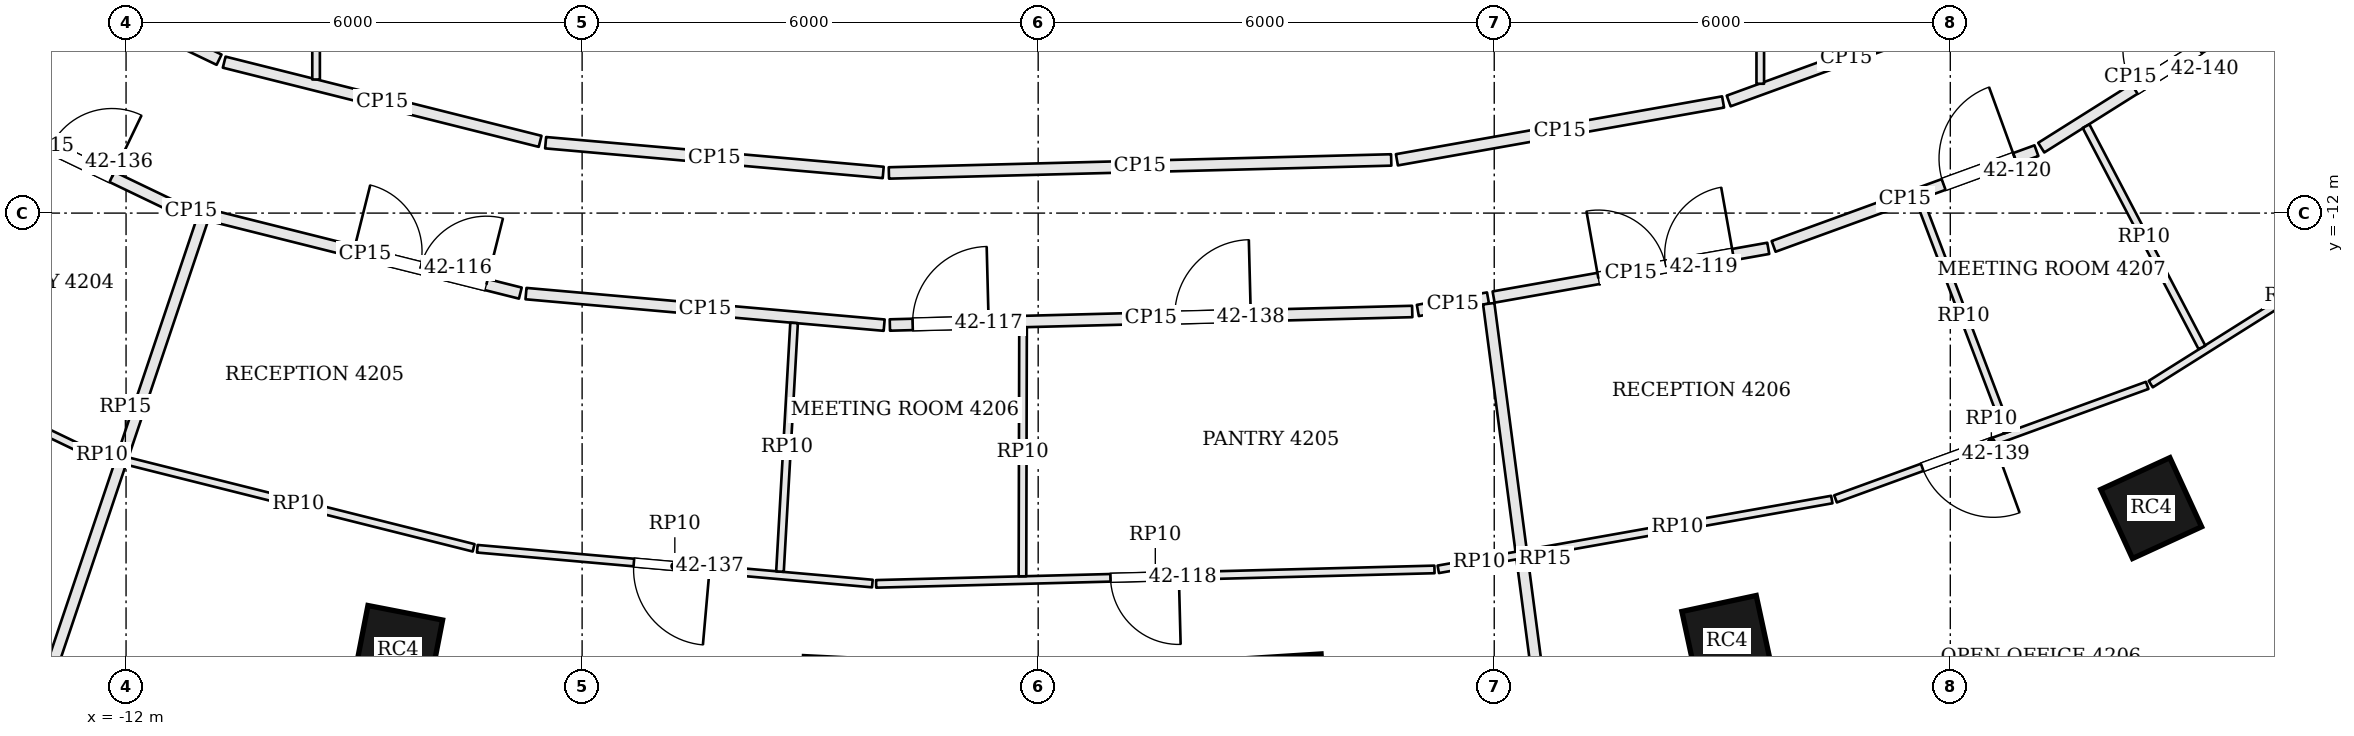
"""IFC4 building model, lengths in metres.
Left out: names, types, materials, properties, quantities, classifications, styles, units other than length and angle.
Written with IfcOpenShell. Run it as: python <this file> out.ifc"""

import sys

from ifc_helpers import new_model, si_unit, direction, frame, frame_2d, origin, origin_2d, place, context, subcontext, project, spatial, rectangle, extrude, element, fill, save


model = new_model("IFC4")
c1 = context("Model", 3, precision=1e-05, world=origin(), true_north=direction((0.0, 1.0)))
c2 = subcontext(c1, "Body", "Model", "MODEL_VIEW")
j1 = project(units=[si_unit("LENGTHUNIT", "METRE"), si_unit("PLANEANGLEUNIT", "RADIAN")], contexts=[c1])
p1 = place(None, origin())
s1 = spatial("IfcSite", under=j1, at=p1, CompositionType="ELEMENT")
p2 = place(p1, origin())
s2 = spatial("IfcBuilding", under=s1, at=p2, CompositionType="ELEMENT")
p3 = place(p2, frame((0.0, 0.0, 174.0)))
s3 = spatial("IfcBuildingStorey", under=s2, at=p3, CompositionType="ELEMENT", Elevation=174.0)
for number, where, z_axis, x_axis in (
    (1, (-8.422, -17.749, -0.7), (0.0, 0.0, 1.0), (0.982, -0.191, 0.0)),
    (2, (3.254, -18.33, -0.7), (0.0, 0.0, 1.0), (0.998, 0.063, 0.0)),
    (3, (9.063, -17.625, -0.7), (0.0, 0.0, 1.0), (0.978, 0.21, 0.0)),
    (4, (14.643, -15.881, -0.7), (0.0, 0.0, 1.0), (0.909, 0.417, 0.0)),
):
    element("IfcColumn", number, at=place(p3, frame(where, z_axis=z_axis, x_axis=x_axis)), inside=s3, PredefinedType="COLUMN", context=c2, shape_type="SweptSolid", body=[
        extrude(rectangle(XDim=1.0, YDim=1.0, at=origin_2d()), origin(), (0.0, 0.0, 1.0), 4.6),
    ])
p4 = place(p3, frame((-14.664, -10.334, 0.0), z_axis=(0.0, 0.0, 1.0), x_axis=(0.901507315282, -0.432763862278, 0.0)))
e5 = element("IfcWall", 5, at=p4, inside=s3, PredefinedType="PARTITIONING", context=c2, shape_type="SweptSolid", body=[
    extrude(rectangle(XDim=3.63, YDim=0.15, at=frame_2d((1.815, 0.0))), origin(), (0.0, 0.0, 1.0), 3.084),
])
p5 = place(p4, frame((1.85, 0.0, 0.0)))
e6 = element("IfcOpeningElement", 6, at=p5, cuts=e5, PredefinedType="OPENING", context=c2, shape_type="SweptSolid", body=[
    extrude(rectangle(XDim=0.9, YDim=2.1, at=frame_2d((0.45, 1.05))), frame((0.0, 0.085, 0.0), z_axis=(0.0, -1.0, 0.0), x_axis=(1.0, 0.0, 0.0)), (0.0, 0.0, 1.0), 0.17),
])
p6 = place(p3, frame((-11.319, -11.923, 0.0), z_axis=(0.0, 0.0, 1.0), x_axis=(0.969942256681, -0.243335198242, 0.0)))
e7 = element("IfcWall", 7, at=p6, inside=s3, PredefinedType="PARTITIONING", context=c2, shape_type="SweptSolid", body=[
    extrude(rectangle(XDim=0.359, YDim=0.15, at=frame_2d((0.18, 0.0))), origin(), (0.0, 0.0, 1.0), 3.084),
])
p7 = place(p3, frame((-13.024, -18.112, 0.0), z_axis=(0.0, 0.0, 1.0), x_axis=(0.319081027508, 0.947727438605, 0.0)))
e8 = element("IfcWall", 8, at=p7, inside=s3, PredefinedType="PARTITIONING", context=c2, shape_type="SweptSolid", body=[
    extrude(rectangle(XDim=6.363, YDim=0.15, at=frame_2d((3.181, 0.0))), origin(), (0.0, 0.0, 1.0), 3.234),
])
p8 = place(p3, frame((-10.897, -12.029, 0.0), z_axis=(0.0, 0.0, 1.0), x_axis=(0.969999087169, -0.24310855783, 0.0)))
e9 = element("IfcWall", 9, at=p8, inside=s3, PredefinedType="PARTITIONING", context=c2, shape_type="SweptSolid", body=[
    extrude(rectangle(XDim=4.211, YDim=0.15, at=frame_2d((2.105, 0.0))), origin(), (0.0, 0.0, 1.0), 3.084),
])
p9 = place(p8, frame((1.95, 0.0, 0.0)))
e10 = element("IfcOpeningElement", 10, at=p9, cuts=e9, PredefinedType="OPENING", context=c2, shape_type="SweptSolid", body=[
    extrude(rectangle(XDim=1.8, YDim=2.1, at=frame_2d((0.9, 1.05))), frame((0.0, 0.085, 0.0), z_axis=(0.0, -1.0, 0.0), x_axis=(1.0, 0.0, 0.0)), (0.0, 0.0, 1.0), 0.17),
])
p10 = place(p3, frame((-6.738, -13.059, 0.0), z_axis=(0.0, 0.0, 1.0), x_axis=(0.996143527037, -0.087738666181, 0.0)))
e11 = element("IfcWall", 11, at=p10, inside=s3, PredefinedType="PARTITIONING", context=c2, shape_type="SweptSolid", body=[
    extrude(rectangle(XDim=4.73, YDim=0.15, at=frame_2d((2.365, 0.0))), origin(), (0.0, 0.0, 1.0), 3.084),
])
p11 = place(p3, frame((-1.951, -13.472, 0.0), z_axis=(0.0, 0.0, 1.0), x_axis=(0.999663898238, 0.025924709429, 0.0)))
e12 = element("IfcWall", 12, at=p11, inside=s3, PredefinedType="PARTITIONING", context=c2, shape_type="SweptSolid", body=[
    extrude(rectangle(XDim=6.875, YDim=0.15, at=frame_2d((3.437, 0.0))), origin(), (0.0, 0.0, 1.0), 3.084),
])
p12 = place(p11, frame((0.3, 0.0, 0.0)))
e13 = element("IfcOpeningElement", 13, at=p12, cuts=e12, PredefinedType="OPENING", context=c2, shape_type="SweptSolid", body=[
    extrude(rectangle(XDim=1.0, YDim=2.4, at=frame_2d((0.5, 1.2))), frame((0.0, 0.085, 0.0), z_axis=(0.0, -1.0, 0.0), x_axis=(1.0, 0.0, 0.0)), (0.0, 0.0, 1.0), 0.17),
])
p13 = place(p11, frame((3.75, 0.0, 0.0)))
e14 = element("IfcOpeningElement", 14, at=p13, cuts=e12, PredefinedType="OPENING", context=c2, shape_type="SweptSolid", body=[
    extrude(rectangle(XDim=1.0, YDim=2.1, at=frame_2d((0.5, 1.05))), frame((0.0, 0.085, 0.0), z_axis=(0.0, -1.0, 0.0), x_axis=(1.0, 0.0, 0.0)), (0.0, 0.0, 1.0), 0.17),
])
p14 = place(p3, frame((4.995, -13.281, 0.0), z_axis=(0.0, 0.0, 1.0), x_axis=(0.984615318048, 0.174736016506, 0.0)))
e15 = element("IfcWall", 15, at=p14, inside=s3, PredefinedType="PARTITIONING", context=c2, shape_type="SweptSolid", body=[
    extrude(rectangle(XDim=0.938, YDim=0.15, at=frame_2d((0.469, 0.0))), origin(), (0.0, 0.0, 1.0), 3.084),
])
p15 = place(p3, frame((6.807, -19.901, 0.0), z_axis=(0.0, 0.0, 1.0), x_axis=(-0.129934596003, 0.991522566945, 0.0)))
e16 = element("IfcWall", 16, at=p15, inside=s3, PredefinedType="PARTITIONING", context=c2, shape_type="SweptSolid", body=[
    extrude(rectangle(XDim=6.766, YDim=0.15, at=frame_2d((3.383, 0.0))), origin(), (0.0, 0.0, 1.0), 3.234),
])
p16 = place(p3, frame((5.992, -13.104, 0.0), z_axis=(0.0, 0.0, 1.0), x_axis=(0.98463249319, 0.174639209096, 0.0)))
e17 = element("IfcWall", 17, at=p16, inside=s3, PredefinedType="PARTITIONING", context=c2, shape_type="SweptSolid", body=[
    extrude(rectangle(XDim=3.67, YDim=0.15, at=frame_2d((1.835, 0.0))), origin(), (0.0, 0.0, 1.0), 3.084),
])
p17 = place(p16, frame((1.4, 0.0, 0.0)))
e18 = element("IfcOpeningElement", 18, at=p17, cuts=e17, PredefinedType="OPENING", context=c2, shape_type="SweptSolid", body=[
    extrude(rectangle(XDim=1.8, YDim=2.1, at=frame_2d((0.9, 1.05))), frame((0.0, 0.085, 0.0), z_axis=(0.0, -1.0, 0.0), x_axis=(1.0, 0.0, 0.0)), (0.0, 0.0, 1.0), 0.17),
])
p18 = place(p3, frame((9.676, -12.438, 0.0), z_axis=(0.0, 0.0, 1.0), x_axis=(0.939640289748, 0.342163887461, 0.0)))
e19 = element("IfcWall", 19, at=p18, inside=s3, PredefinedType="PARTITIONING", context=c2, shape_type="SweptSolid", body=[
    extrude(rectangle(XDim=3.68, YDim=0.15, at=frame_2d((1.84, 0.0))), origin(), (0.0, 0.0, 1.0), 3.084),
])
p19 = place(p18, frame((2.38, 0.0, 0.0)))
e20 = element("IfcOpeningElement", 20, at=p19, cuts=e19, PredefinedType="OPENING", context=c2, shape_type="SweptSolid", body=[
    extrude(rectangle(XDim=1.0, YDim=2.4, at=frame_2d((0.5, 1.2))), frame((0.0, 0.085, 0.0), z_axis=(0.0, -1.0, 0.0), x_axis=(1.0, 0.0, 0.0)), (0.0, 0.0, 1.0), 0.17),
])
p20 = place(p3, frame((13.197, -11.139, 0.0), z_axis=(0.0, 0.0, 1.0), x_axis=(0.846390903833, 0.532562144644, 0.0)))
e21 = element("IfcWall", 21, at=p20, inside=s3, PredefinedType="PARTITIONING", context=c2, shape_type="SweptSolid", body=[
    extrude(rectangle(XDim=3.481, YDim=0.15, at=frame_2d((1.741, 0.0))), origin(), (0.0, 0.0, 1.0), 3.084),
])
p21 = place(p20, frame((1.45, 0.0, 0.0)))
e22 = element("IfcOpeningElement", 22, at=p21, cuts=e21, PredefinedType="OPENING", context=c2, shape_type="SweptSolid", body=[
    extrude(rectangle(XDim=1.0, YDim=2.1, at=frame_2d((0.5, 1.05))), frame((0.0, 0.085, 0.0), z_axis=(0.0, -1.0, 0.0), x_axis=(1.0, 0.0, 0.0)), (0.0, 0.0, 1.0), 0.17),
])
p22 = place(p3, frame((12.178, -9.398, 0.0), z_axis=(0.0, 0.0, 1.0), x_axis=(-0.939609240084, -0.342249143093, 0.0)))
e23 = element("IfcWall", 23, at=p22, inside=s3, PredefinedType="PARTITIONING", context=c2, shape_type="SweptSolid", body=[
    extrude(rectangle(XDim=3.292, YDim=0.15, at=frame_2d((1.646, 0.0))), origin(), (0.0, 0.0, 1.0), 3.084),
])
p23 = place(p3, frame((9.01, -10.538, 0.0), z_axis=(0.0, 0.0, 1.0), x_axis=(-0.984645638575, -0.174565077936, 0.0)))
e24 = element("IfcWall", 24, at=p23, inside=s3, PredefinedType="PARTITIONING", context=c2, shape_type="SweptSolid", body=[
    extrude(rectangle(XDim=4.358, YDim=0.15, at=frame_2d((2.179, 0.0))), origin(), (0.0, 0.0, 1.0), 3.084),
])
p24 = place(p3, frame((4.645, -11.301, 0.0), z_axis=(0.0, 0.0, 1.0), x_axis=(-0.9996648469, -0.02588810291, 0.0)))
e25 = element("IfcWall", 25, at=p24, inside=s3, PredefinedType="PARTITIONING", context=c2, shape_type="SweptSolid", body=[
    extrude(rectangle(XDim=6.611, YDim=0.15, at=frame_2d((3.305, 0.0))), origin(), (0.0, 0.0, 1.0), 3.084),
])
p25 = place(p3, frame((-2.039, -11.465, 0.0), z_axis=(0.0, 0.0, 1.0), x_axis=(-0.996139855484, 0.087780341286, 0.0)))
e26 = element("IfcWall", 26, at=p25, inside=s3, PredefinedType="PARTITIONING", context=c2, shape_type="SweptSolid", body=[
    extrude(rectangle(XDim=4.458, YDim=0.15, at=frame_2d((2.229, 0.0))), origin(), (0.0, 0.0, 1.0), 3.084),
])
p26 = place(p3, frame((-6.553, -11.056, 0.0), z_axis=(0.0, 0.0, 1.0), x_axis=(-0.970004917182, 0.243085294995, 0.0)))
e27 = element("IfcWall", 27, at=p26, inside=s3, PredefinedType="PARTITIONING", context=c2, shape_type="SweptSolid", body=[
    extrude(rectangle(XDim=4.284, YDim=0.15, at=frame_2d((2.142, 0.0))), origin(), (0.0, 0.0, 1.0), 3.084),
])
p27 = place(p3, frame((-10.776, -9.982, 0.0), z_axis=(0.0, 0.0, 1.0), x_axis=(-0.901511079436, 0.432756020933, 0.0)))
e28 = element("IfcWall", 28, at=p27, inside=s3, PredefinedType="PARTITIONING", context=c2, shape_type="SweptSolid", body=[
    extrude(rectangle(XDim=3.181, YDim=0.15, at=frame_2d((1.59, 0.0))), origin(), (0.0, 0.0, 1.0), 3.084),
])
p28 = place(p3, frame((-12.078, -15.238, 0.0), z_axis=(0.0, 0.0, 1.0), x_axis=(-0.970024978464, 0.243005228658, 0.0)))
e29 = element("IfcWall", 29, at=p28, inside=s3, PredefinedType="PARTITIONING", context=c2, shape_type="SweptSolid", body=[
    extrude(rectangle(XDim=0.489, YDim=0.1, at=frame_2d((0.245, 0.0))), origin(), (0.0, 0.0, 1.0), 3.084),
])
p29 = place(p3, frame((-12.597, -15.098, 0.0), z_axis=(0.0, 0.0, 1.0), x_axis=(-0.901514437286, 0.432749025839, 0.0)))
e30 = element("IfcWall", 30, at=p29, inside=s3, PredefinedType="PARTITIONING", context=c2, shape_type="SweptSolid", body=[
    extrude(rectangle(XDim=4.42, YDim=0.1, at=frame_2d((2.21, 0.0))), origin(), (0.0, 0.0, 1.0), 3.084),
])
p30 = place(p3, frame((6.34, -16.496, 0.0), z_axis=(0.0, 0.0, 1.0), x_axis=(-0.984632558058, -0.174638843366, 0.0)))
e31 = element("IfcWall", 31, at=p30, inside=s3, PredefinedType="PARTITIONING", context=c2, shape_type="SweptSolid", body=[
    extrude(rectangle(XDim=1.093, YDim=0.1, at=frame_2d((0.547, 0.0))), origin(), (0.0, 0.0, 1.0), 3.084),
])
p31 = place(p3, frame((5.214, -16.688, 0.0), z_axis=(0.0, 0.0, 1.0), x_axis=(-0.999664981446, -0.025882906921, 0.0)))
e32 = element("IfcWall", 32, at=p31, inside=s3, PredefinedType="PARTITIONING", context=c2, shape_type="SweptSolid", body=[
    extrude(rectangle(XDim=7.348, YDim=0.1, at=frame_2d((3.674, 0.0))), origin(), (0.0, 0.0, 1.0), 3.084),
])
p32 = place(p31, frame((3.364, 0.0, 0.0)))
e33 = element("IfcOpeningElement", 33, at=p32, cuts=e32, PredefinedType="OPENING", context=c2, shape_type="SweptSolid", body=[
    extrude(rectangle(XDim=0.9, YDim=2.1, at=frame_2d((0.45, 1.05))), frame((0.0, 0.06, 0.0), z_axis=(0.0, -1.0, 0.0), x_axis=(1.0, 0.0, 0.0)), (0.0, 0.0, 1.0), 0.12),
])
p33 = place(p3, frame((-2.181, -16.874, 0.0), z_axis=(0.0, 0.0, 1.0), x_axis=(-0.996143934904, 0.087734035321, 0.0)))
e34 = element("IfcWall", 34, at=p33, inside=s3, PredefinedType="PARTITIONING", context=c2, shape_type="SweptSolid", body=[
    extrude(rectangle(XDim=5.218, YDim=0.1, at=frame_2d((2.609, 0.0))), origin(), (0.0, 0.0, 1.0), 3.084),
])
p34 = place(p33, frame((2.15, 0.0, 0.0)))
e35 = element("IfcOpeningElement", 35, at=p34, cuts=e34, PredefinedType="OPENING", context=c2, shape_type="SweptSolid", body=[
    extrude(rectangle(XDim=1.0, YDim=2.1, at=frame_2d((0.5, 1.05))), frame((0.0, 0.06, 0.0), z_axis=(0.0, -1.0, 0.0), x_axis=(1.0, 0.0, 0.0)), (0.0, 0.0, 1.0), 0.12),
])
p35 = place(p3, frame((-7.427, -16.404, 0.0), z_axis=(0.0, 0.0, 1.0), x_axis=(-0.970009433409, 0.243067272783, 0.0)))
e36 = element("IfcWall", 36, at=p35, inside=s3, PredefinedType="PARTITIONING", context=c2, shape_type="SweptSolid", body=[
    extrude(rectangle(XDim=4.754, YDim=0.1, at=frame_2d((2.377, 0.0))), origin(), (0.0, 0.0, 1.0), 3.084),
])
p36 = place(p3, frame((-3.211, -13.445, 0.0), z_axis=(0.0, 0.0, 1.0), x_axis=(-0.056703901856, -0.99839103938, 0.0)))
e37 = element("IfcWall", 37, at=p36, inside=s3, PredefinedType="PARTITIONING", context=c2, shape_type="SweptSolid", body=[
    extrude(rectangle(XDim=3.277, YDim=0.1, at=frame_2d((1.638, 0.0))), origin(), (0.0, 0.0, 1.0), 3.084),
])
p37 = place(p3, frame((-0.199, -13.502, 0.0), z_axis=(0.0, 0.0, 1.0), x_axis=(-0.002309978934, -0.999997331995, 0.0)))
e38 = element("IfcWall", 38, at=p37, inside=s3, PredefinedType="PARTITIONING", context=c2, shape_type="SweptSolid", body=[
    extrude(rectangle(XDim=3.276, YDim=0.1, at=frame_2d((1.638, 0.0))), origin(), (0.0, 0.0, 1.0), 3.084),
])
p38 = place(p3, frame((18.316, -11.935, 0.0), z_axis=(0.0, 0.0, 1.0), x_axis=(-0.84637539713, -0.532586788358, 0.0)))
e39 = element("IfcWall", 39, at=p38, inside=s3, PredefinedType="PARTITIONING", context=c2, shape_type="SweptSolid", body=[
    extrude(rectangle(XDim=4.346, YDim=0.1, at=frame_2d((2.173, 0.0))), origin(), (0.0, 0.0, 1.0), 3.084),
])
p39 = place(p3, frame((14.59, -14.267, 0.0), z_axis=(0.0, 0.0, 1.0), x_axis=(-0.939623405418, -0.342210251148, 0.0)))
e40 = element("IfcWall", 40, at=p39, inside=s3, PredefinedType="PARTITIONING", context=c2, shape_type="SweptSolid", body=[
    extrude(rectangle(XDim=4.363, YDim=0.1, at=frame_2d((2.182, 0.0))), origin(), (0.0, 0.0, 1.0), 3.084),
])
p40 = place(p39, frame((2.15, 0.0, 0.0)))
e41 = element("IfcOpeningElement", 41, at=p40, cuts=e40, PredefinedType="OPENING", context=c2, shape_type="SweptSolid", body=[
    extrude(rectangle(XDim=1.0, YDim=2.1, at=frame_2d((0.5, 1.05))), frame((0.0, 0.06, 0.0), z_axis=(0.0, -1.0, 0.0), x_axis=(1.0, 0.0, 0.0)), (0.0, 0.0, 1.0), 0.12),
])
p41 = place(p3, frame((10.441, -15.769, 0.0), z_axis=(0.0, 0.0, 1.0), x_axis=(-0.984637220861, -0.174612551941, 0.0)))
e42 = element("IfcWall", 42, at=p41, inside=s3, PredefinedType="PARTITIONING", context=c2, shape_type="SweptSolid", body=[
    extrude(rectangle(XDim=4.125, YDim=0.1, at=frame_2d((2.062, 0.0))), origin(), (0.0, 0.0, 1.0), 3.084),
])
p42 = place(p3, frame((11.594, -11.819, 0.0), z_axis=(0.0, 0.0, 1.0), x_axis=(0.354584575087, -0.935023945742, 0.0)))
e43 = element("IfcWall", 43, at=p42, inside=s3, PredefinedType="PARTITIONING", context=c2, shape_type="SweptSolid", body=[
    extrude(rectangle(XDim=3.275, YDim=0.1, at=frame_2d((1.638, 0.0))), origin(), (0.0, 0.0, 1.0), 3.084),
])
p43 = place(p3, frame((13.786, -10.856, 0.0), z_axis=(0.0, 0.0, 1.0), x_axis=(0.464015323866, -0.885827172318, 0.0)))
e44 = element("IfcWall", 44, at=p43, inside=s3, PredefinedType="PARTITIONING", context=c2, shape_type="SweptSolid", body=[
    extrude(rectangle(XDim=3.286, YDim=0.1, at=frame_2d((1.643, 0.0))), origin(), (0.0, 0.0, 1.0), 3.084),
])
p44 = place(p3, frame((-9.5, -10.242, 0.0), z_axis=(0.0, 0.0, 1.0), x_axis=(0.0, 1.0, 0.0)))
e45 = element("IfcWall", 45, at=p44, inside=s3, PredefinedType="PARTITIONING", context=c2, shape_type="SweptSolid", body=[
    extrude(rectangle(XDim=5.167, YDim=0.1, at=frame_2d((2.583, 0.0))), origin(), (0.0, 0.0, 1.0), 3.084),
])
p45 = place(p3, frame((9.5, -10.299, 0.0), z_axis=(0.0, 0.0, 1.0), x_axis=(0.0, 1.0, 0.0)))
e46 = element("IfcWall", 46, at=p45, inside=s3, PredefinedType="PARTITIONING", context=c2, shape_type="SweptSolid", body=[
    extrude(rectangle(XDim=5.224, YDim=0.1, at=frame_2d((2.612, 0.0))), origin(), (0.0, 0.0, 1.0), 3.084),
])
p46 = place(p9, origin())
e47 = element("IfcDoor", 47, at=p46, inside=s3, OperationType="DOUBLE_DOOR_SINGLE_SWING", PredefinedType="DOOR", context=c2, shape_type="SweptSolid", body=[
    extrude(rectangle(XDim=1.8, YDim=2.1, at=frame_2d((0.9, 1.05))), frame((0.0, 0.025, 0.0), z_axis=(0.0, -1.0, 0.0), x_axis=(1.0, 0.0, 0.0)), (0.0, 0.0, 1.0), 0.05),
])
fill(e10, e47)
p47 = place(p12, origin())
e48 = element("IfcDoor", 48, at=p47, inside=s3, OperationType="SINGLE_SWING_RIGHT", PredefinedType="DOOR", context=c2, shape_type="SweptSolid", body=[
    extrude(rectangle(XDim=1.0, YDim=2.4, at=frame_2d((0.5, 1.2))), frame((0.0, 0.025, 0.0), z_axis=(0.0, -1.0, 0.0), x_axis=(1.0, 0.0, 0.0)), (0.0, 0.0, 1.0), 0.05),
])
fill(e13, e48)
p48 = place(p32, origin())
e49 = element("IfcDoor", 49, at=p48, inside=s3, OperationType="SINGLE_SWING_LEFT", PredefinedType="DOOR", context=c2, shape_type="SweptSolid", body=[
    extrude(rectangle(XDim=0.9, YDim=2.1, at=frame_2d((0.45, 1.05))), frame((0.0, 0.025, 0.0), z_axis=(0.0, -1.0, 0.0), x_axis=(1.0, 0.0, 0.0)), (0.0, 0.0, 1.0), 0.05),
])
fill(e33, e49)
p49 = place(p17, origin())
e50 = element("IfcDoor", 50, at=p49, inside=s3, OperationType="DOUBLE_DOOR_SINGLE_SWING", PredefinedType="DOOR", context=c2, shape_type="SweptSolid", body=[
    extrude(rectangle(XDim=1.8, YDim=2.1, at=frame_2d((0.9, 1.05))), frame((0.0, 0.025, 0.0), z_axis=(0.0, -1.0, 0.0), x_axis=(1.0, 0.0, 0.0)), (0.0, 0.0, 1.0), 0.05),
])
fill(e18, e50)
p50 = place(p19, origin())
e51 = element("IfcDoor", 51, at=p50, inside=s3, OperationType="SINGLE_SWING_RIGHT", PredefinedType="DOOR", context=c2, shape_type="SweptSolid", body=[
    extrude(rectangle(XDim=1.0, YDim=2.4, at=frame_2d((0.5, 1.2))), frame((0.0, 0.025, 0.0), z_axis=(0.0, -1.0, 0.0), x_axis=(1.0, 0.0, 0.0)), (0.0, 0.0, 1.0), 0.05),
])
fill(e20, e51)
p51 = place(p5, origin())
e52 = element("IfcDoor", 52, at=p51, inside=s3, OperationType="SINGLE_SWING_RIGHT", PredefinedType="DOOR", context=c2, shape_type="SweptSolid", body=[
    extrude(rectangle(XDim=0.9, YDim=2.1, at=frame_2d((0.45, 1.05))), frame((0.0, 0.025, 0.0), z_axis=(0.0, -1.0, 0.0), x_axis=(1.0, 0.0, 0.0)), (0.0, 0.0, 1.0), 0.05),
])
fill(e6, e52)
p52 = place(p34, origin())
e53 = element("IfcDoor", 53, at=p52, inside=s3, OperationType="SINGLE_SWING_LEFT", PredefinedType="DOOR", context=c2, shape_type="SweptSolid", body=[
    extrude(rectangle(XDim=1.0, YDim=2.1, at=frame_2d((0.5, 1.05))), frame((0.0, 0.025, 0.0), z_axis=(0.0, -1.0, 0.0), x_axis=(1.0, 0.0, 0.0)), (0.0, 0.0, 1.0), 0.05),
])
fill(e35, e53)
p53 = place(p13, origin())
e54 = element("IfcDoor", 54, at=p53, inside=s3, OperationType="SINGLE_SWING_RIGHT", PredefinedType="DOOR", context=c2, shape_type="SweptSolid", body=[
    extrude(rectangle(XDim=1.0, YDim=2.1, at=frame_2d((0.5, 1.05))), frame((0.0, 0.025, 0.0), z_axis=(0.0, -1.0, 0.0), x_axis=(1.0, 0.0, 0.0)), (0.0, 0.0, 1.0), 0.05),
])
fill(e14, e54)
p54 = place(p40, origin())
e55 = element("IfcDoor", 55, at=p54, inside=s3, OperationType="SINGLE_SWING_LEFT", PredefinedType="DOOR", context=c2, shape_type="SweptSolid", body=[
    extrude(rectangle(XDim=1.0, YDim=2.1, at=frame_2d((0.5, 1.05))), frame((0.0, 0.025, 0.0), z_axis=(0.0, -1.0, 0.0), x_axis=(1.0, 0.0, 0.0)), (0.0, 0.0, 1.0), 0.05),
])
fill(e41, e55)
p55 = place(p21, origin())
e56 = element("IfcDoor", 56, at=p55, inside=s3, OperationType="SINGLE_SWING_RIGHT", PredefinedType="DOOR", context=c2, shape_type="SweptSolid", body=[
    extrude(rectangle(XDim=1.0, YDim=2.1, at=frame_2d((0.5, 1.05))), frame((0.0, 0.025, 0.0), z_axis=(0.0, -1.0, 0.0), x_axis=(1.0, 0.0, 0.0)), (0.0, 0.0, 1.0), 0.05),
])
fill(e22, e56)
save(model, sys.argv[1])
